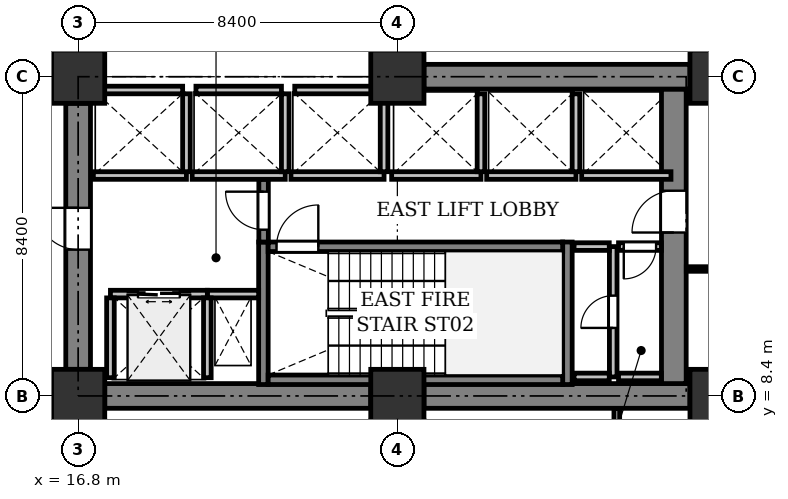
"""IFC4 building model, lengths in metres.
Left out: names, types, materials, properties, quantities, classifications, styles, units other than length and angle.
Written with IfcOpenShell. Run it as: python <this file> out.ifc"""

import sys

from ifc_helpers import new_model, si_unit, direction, frame, frame_2d, origin, origin_2d, place, context, subcontext, project, spatial, rectangle, extrude, element, fill, save


model = new_model("IFC4")
c1 = context("Model", 3, precision=1e-05, world=origin(), true_north=direction((0.0, 1.0)))
c2 = subcontext(c1, "Body", "Model", "MODEL_VIEW")
j1 = project(units=[si_unit("LENGTHUNIT", "METRE"), si_unit("PLANEANGLEUNIT", "RADIAN")], contexts=[c1])
p1 = place(None, origin())
s1 = spatial("IfcSite", under=j1, at=p1, CompositionType="ELEMENT")
p2 = place(p1, origin())
s2 = spatial("IfcBuilding", under=s1, at=p2, CompositionType="ELEMENT")
p3 = place(p2, frame((0.0, 0.0, 50.0)))
s3 = spatial("IfcBuildingStorey", under=s2, at=p3, CompositionType="ELEMENT", Elevation=50.0)
for number, where, z_axis, x_axis in (
    (1, (16.8, 8.4, 0.0), (0.0, 0.0, 1.0), (1.0, 0.0, 0.0)),
    (2, (16.8, 16.8, 0.0), (0.0, 0.0, 1.0), (1.0, 0.0, 0.0)),
    (3, (25.2, 8.4, 0.0), (0.0, 0.0, 1.0), (1.0, 0.0, 0.0)),
    (4, (25.2, 16.8, 0.0), (0.0, 0.0, 1.0), (1.0, 0.0, 0.0)),
    (5, (33.6, 8.4, 0.0), (0.0, 0.0, 1.0), (1.0, 0.0, 0.0)),
    (6, (33.6, 16.8, 0.0), (0.0, 0.0, 1.0), (1.0, 0.0, 0.0)),
):
    element("IfcColumn", number, at=place(p3, frame(where, z_axis=z_axis, x_axis=x_axis)), inside=s3, PredefinedType="COLUMN", context=c2, shape_type="SweptSolid", body=[
        extrude(rectangle(XDim=1.4, YDim=1.4, at=origin_2d()), origin(), (0.0, 0.0, 1.0), 4.2),
    ])
for number, where, z_axis, x_axis in (
    (7, (17.5, 8.4, 0.0), (0.0, 0.0, 1.0), (1.0, 0.0, 0.0)),
    (8, (25.9, 8.4, 0.0), (0.0, 0.0, 1.0), (1.0, 0.0, 0.0)),
):
    element("IfcWall", number, at=place(p3, frame(where, z_axis=z_axis, x_axis=x_axis)), inside=s3, PredefinedType="SHEAR", context=c2, shape_type="SweptSolid", body=[
        extrude(rectangle(XDim=7.0, YDim=0.65, at=frame_2d((3.5, 0.0))), origin(), (0.0, 0.0, 1.0), 3.925),
    ])
p4 = place(p3, frame((32.475, 8.725, 0.0), z_axis=(0.0, 0.0, 1.0), x_axis=(0.0, 1.0, 0.0)))
e9 = element("IfcWall", 9, at=p4, inside=s3, PredefinedType="SHEAR", context=c2, shape_type="SweptSolid", body=[
    extrude(rectangle(XDim=7.75, YDim=0.65, at=frame_2d((3.875, 0.0))), origin(), (0.0, 0.0, 1.0), 3.925),
])
p5 = place(p4, frame((3.975, 0.0, 0.0)))
e10 = element("IfcOpeningElement", 10, at=p5, cuts=e9, PredefinedType="OPENING", context=c2, shape_type="SweptSolid", body=[
    extrude(rectangle(XDim=1.1, YDim=2.15, at=frame_2d((0.55, 1.075))), frame((0.0, 0.335, 0.0), z_axis=(0.0, -1.0, 0.0), x_axis=(1.0, 0.0, 0.0)), (0.0, 0.0, 1.0), 0.67),
])
p6 = place(p3, frame((16.8, 9.1, 0.0), z_axis=(0.0, 0.0, 1.0), x_axis=(0.0, 1.0, 0.0)))
e11 = element("IfcWall", 11, at=p6, inside=s3, PredefinedType="SHEAR", context=c2, shape_type="SweptSolid", body=[
    extrude(rectangle(XDim=7.0, YDim=0.65, at=frame_2d((3.5, 0.0))), origin(), (0.0, 0.0, 1.0), 3.925),
])
p7 = place(p6, frame((3.15, 0.0, 0.0)))
e12 = element("IfcOpeningElement", 12, at=p7, cuts=e11, PredefinedType="OPENING", context=c2, shape_type="SweptSolid", body=[
    extrude(rectangle(XDim=1.1, YDim=2.15, at=frame_2d((0.55, 1.075))), frame((0.0, 0.335, 0.0), z_axis=(0.0, -1.0, 0.0), x_axis=(1.0, 0.0, 0.0)), (0.0, 0.0, 1.0), 0.67),
])
p8 = place(p3, frame((25.9, 16.8, 0.0), z_axis=(0.0, 0.0, 1.0), x_axis=(1.0, 0.0, 0.0)))
e13 = element("IfcWall", 13, at=p8, inside=s3, PredefinedType="SHEAR", context=c2, shape_type="SweptSolid", body=[
    extrude(rectangle(XDim=7.0, YDim=0.65, at=frame_2d((3.5, 0.0))), origin(), (0.0, 0.0, 1.0), 3.925),
])
for number, where, z_axis, x_axis in (
    (14, (21.675, 8.7, 0.0), (0.0, 0.0, 1.0), (0.0, 1.0, 0.0)),
    (15, (29.675, 8.7, 0.0), (0.0, 0.0, 1.0), (0.0, 1.0, 0.0)),
):
    element("IfcWall", number, at=place(p3, frame(where, z_axis=z_axis, x_axis=x_axis)), inside=s3, PredefinedType="SHEAR", context=c2, shape_type="SweptSolid", body=[
        extrude(rectangle(XDim=3.75, YDim=0.25, at=frame_2d((1.875, 0.0))), origin(), (0.0, 0.0, 1.0), 3.925),
    ])
p9 = place(p3, frame((21.8, 8.825, 0.0), z_axis=(0.0, 0.0, 1.0), x_axis=(1.0, 0.0, 0.0)))
e16 = element("IfcWall", 16, at=p9, inside=s3, PredefinedType="SHEAR", context=c2, shape_type="SweptSolid", body=[
    extrude(rectangle(XDim=7.75, YDim=0.25, at=frame_2d((3.875, 0.0))), origin(), (0.0, 0.0, 1.0), 3.925),
])
p10 = place(p3, frame((21.8, 12.325, 0.0), z_axis=(0.0, 0.0, 1.0), x_axis=(1.0, 0.0, 0.0)))
e17 = element("IfcWall", 17, at=p10, inside=s3, PredefinedType="SHEAR", context=c2, shape_type="SweptSolid", body=[
    extrude(rectangle(XDim=7.75, YDim=0.25, at=frame_2d((3.875, 0.0))), origin(), (0.0, 0.0, 1.0), 3.925),
])
p11 = place(p10, frame((0.22, 0.0, 0.0)))
e18 = element("IfcOpeningElement", 18, at=p11, cuts=e17, PredefinedType="OPENING", context=c2, shape_type="SweptSolid", body=[
    extrude(rectangle(XDim=1.1, YDim=2.15, at=frame_2d((0.55, 1.075))), frame((0.0, 0.135, 0.0), z_axis=(0.0, -1.0, 0.0), x_axis=(1.0, 0.0, 0.0)), (0.0, 0.0, 1.0), 0.27),
])
p12 = place(p3, frame((20.2, 11.08, 0.0), z_axis=(0.0, 0.0, 1.0), x_axis=(1.0, 0.0, 0.0)))
e19 = element("IfcWall", 19, at=p12, inside=s3, PredefinedType="PARTITIONING", context=c2, shape_type="SweptSolid", body=[
    extrude(rectangle(XDim=1.35, YDim=0.2, at=frame_2d((0.675, 0.0))), origin(), (0.0, 0.0, 1.0), 3.925),
])
p13 = place(p3, frame((21.68, 12.45, 0.0), z_axis=(0.0, 0.0, 1.0), x_axis=(0.0, 1.0, 0.0)))
e20 = element("IfcWall", 20, at=p13, inside=s3, PredefinedType="SHEAR", context=c2, shape_type="SweptSolid", body=[
    extrude(rectangle(XDim=1.65, YDim=0.25, at=frame_2d((0.825, 0.0))), origin(), (0.0, 0.0, 1.0), 3.925),
])
p14 = place(p13, frame((0.325, 0.0, 0.0)))
e21 = element("IfcOpeningElement", 21, at=p14, cuts=e20, PredefinedType="OPENING", context=c2, shape_type="SweptSolid", body=[
    extrude(rectangle(XDim=1.0, YDim=2.15, at=frame_2d((0.5, 1.075))), frame((0.0, 0.135, 0.0), z_axis=(0.0, -1.0, 0.0), x_axis=(1.0, 0.0, 0.0)), (0.0, 0.0, 1.0), 0.27),
])
p15 = place(p3, frame((17.65, 11.08, 0.0), z_axis=(0.0, 0.0, 1.0), x_axis=(1.0, 0.0, 0.0)))
e22 = element("IfcWall", 22, at=p15, inside=s3, PredefinedType="PARTITIONING", context=c2, shape_type="SweptSolid", body=[
    extrude(rectangle(XDim=2.55, YDim=0.2, at=frame_2d((1.275, 0.0))), origin(), (0.0, 0.0, 1.0), 3.925),
])
p16 = place(p15, frame((0.725, 0.0, 0.0)))
e23 = element("IfcOpeningElement", 23, at=p16, cuts=e22, PredefinedType="OPENING", context=c2, shape_type="SweptSolid", body=[
    extrude(rectangle(XDim=1.1, YDim=2.2, at=frame_2d((0.55, 1.1))), frame((0.0, 0.11, 0.0), z_axis=(0.0, -1.0, 0.0), x_axis=(1.0, 0.0, 0.0)), (0.0, 0.0, 1.0), 0.22),
])
for number, where, z_axis, x_axis in (
    (24, (20.2, 8.88, 0.0), (0.0, 0.0, 1.0), (0.0, 1.0, 0.0)),
    (25, (17.65, 8.88, 0.0), (0.0, 0.0, 1.0), (0.0, 1.0, 0.0)),
):
    element("IfcWall", number, at=place(p3, frame(where, z_axis=z_axis, x_axis=x_axis)), inside=s3, PredefinedType="PARTITIONING", context=c2, shape_type="SweptSolid", body=[
        extrude(rectangle(XDim=2.1, YDim=0.2, at=frame_2d((1.05, 0.0))), origin(), (0.0, 0.0, 1.0), 3.925),
    ])
p17 = place(p3, frame((17.2, 14.2, 0.0), z_axis=(0.0, 0.0, 1.0), x_axis=(1.0, 0.0, 0.0)))
e26 = element("IfcWall", 26, at=p17, inside=s3, PredefinedType="PARTITIONING", context=c2, shape_type="SweptSolid", body=[
    extrude(rectangle(XDim=2.45, YDim=0.2, at=frame_2d((1.225, 0.0))), origin(), (0.0, 0.0, 1.0), 3.925),
])
p18 = place(p3, frame((19.65, 14.3, 0.0), z_axis=(0.0, 0.0, 1.0), x_axis=(0.0, 1.0, 0.0)))
e27 = element("IfcWall", 27, at=p18, inside=s3, PredefinedType="PARTITIONING", context=c2, shape_type="SweptSolid", body=[
    extrude(rectangle(XDim=2.05, YDim=0.2, at=frame_2d((1.025, 0.0))), origin(), (0.0, 0.0, 1.0), 3.925),
])
p19 = place(p3, frame((17.3, 16.45, 0.0), z_axis=(0.0, 0.0, 1.0), x_axis=(1.0, 0.0, 0.0)))
e28 = element("IfcWall", 28, at=p19, inside=s3, PredefinedType="PARTITIONING", context=c2, shape_type="SweptSolid", body=[
    extrude(rectangle(XDim=2.25, YDim=0.2, at=frame_2d((1.125, 0.0))), origin(), (0.0, 0.0, 1.0), 3.925),
])
p20 = place(p3, frame((19.8, 14.2, 0.0), z_axis=(0.0, 0.0, 1.0), x_axis=(1.0, 0.0, 0.0)))
e29 = element("IfcWall", 29, at=p20, inside=s3, PredefinedType="PARTITIONING", context=c2, shape_type="SweptSolid", body=[
    extrude(rectangle(XDim=2.45, YDim=0.2, at=frame_2d((1.225, 0.0))), origin(), (0.0, 0.0, 1.0), 3.925),
])
p21 = place(p3, frame((22.25, 14.3, 0.0), z_axis=(0.0, 0.0, 1.0), x_axis=(0.0, 1.0, 0.0)))
e30 = element("IfcWall", 30, at=p21, inside=s3, PredefinedType="PARTITIONING", context=c2, shape_type="SweptSolid", body=[
    extrude(rectangle(XDim=2.05, YDim=0.2, at=frame_2d((1.025, 0.0))), origin(), (0.0, 0.0, 1.0), 3.925),
])
p22 = place(p3, frame((19.9, 16.45, 0.0), z_axis=(0.0, 0.0, 1.0), x_axis=(1.0, 0.0, 0.0)))
e31 = element("IfcWall", 31, at=p22, inside=s3, PredefinedType="PARTITIONING", context=c2, shape_type="SweptSolid", body=[
    extrude(rectangle(XDim=2.25, YDim=0.2, at=frame_2d((1.125, 0.0))), origin(), (0.0, 0.0, 1.0), 3.925),
])
p23 = place(p3, frame((22.4, 14.2, 0.0), z_axis=(0.0, 0.0, 1.0), x_axis=(1.0, 0.0, 0.0)))
e32 = element("IfcWall", 32, at=p23, inside=s3, PredefinedType="PARTITIONING", context=c2, shape_type="SweptSolid", body=[
    extrude(rectangle(XDim=2.45, YDim=0.2, at=frame_2d((1.225, 0.0))), origin(), (0.0, 0.0, 1.0), 3.925),
])
p24 = place(p3, frame((24.85, 14.3, 0.0), z_axis=(0.0, 0.0, 1.0), x_axis=(0.0, 1.0, 0.0)))
e33 = element("IfcWall", 33, at=p24, inside=s3, PredefinedType="PARTITIONING", context=c2, shape_type="SweptSolid", body=[
    extrude(rectangle(XDim=2.05, YDim=0.2, at=frame_2d((1.025, 0.0))), origin(), (0.0, 0.0, 1.0), 3.925),
])
p25 = place(p3, frame((22.5, 16.45, 0.0), z_axis=(0.0, 0.0, 1.0), x_axis=(1.0, 0.0, 0.0)))
e34 = element("IfcWall", 34, at=p25, inside=s3, PredefinedType="PARTITIONING", context=c2, shape_type="SweptSolid", body=[
    extrude(rectangle(XDim=2.25, YDim=0.2, at=frame_2d((1.125, 0.0))), origin(), (0.0, 0.0, 1.0), 3.925),
])
p26 = place(p3, frame((25.05, 14.2, 0.0), z_axis=(0.0, 0.0, 1.0), x_axis=(1.0, 0.0, 0.0)))
e35 = element("IfcWall", 35, at=p26, inside=s3, PredefinedType="PARTITIONING", context=c2, shape_type="SweptSolid", body=[
    extrude(rectangle(XDim=2.35, YDim=0.2, at=frame_2d((1.175, 0.0))), origin(), (0.0, 0.0, 1.0), 3.925),
])
p27 = place(p3, frame((27.4, 14.3, 0.0), z_axis=(0.0, 0.0, 1.0), x_axis=(0.0, 1.0, 0.0)))
e36 = element("IfcWall", 36, at=p27, inside=s3, PredefinedType="PARTITIONING", context=c2, shape_type="SweptSolid", body=[
    extrude(rectangle(XDim=2.05, YDim=0.2, at=frame_2d((1.025, 0.0))), origin(), (0.0, 0.0, 1.0), 3.925),
])
p28 = place(p3, frame((27.55, 14.2, 0.0), z_axis=(0.0, 0.0, 1.0), x_axis=(1.0, 0.0, 0.0)))
e37 = element("IfcWall", 37, at=p28, inside=s3, PredefinedType="PARTITIONING", context=c2, shape_type="SweptSolid", body=[
    extrude(rectangle(XDim=2.35, YDim=0.2, at=frame_2d((1.175, 0.0))), origin(), (0.0, 0.0, 1.0), 3.925),
])
p29 = place(p3, frame((29.9, 14.3, 0.0), z_axis=(0.0, 0.0, 1.0), x_axis=(0.0, 1.0, 0.0)))
e38 = element("IfcWall", 38, at=p29, inside=s3, PredefinedType="PARTITIONING", context=c2, shape_type="SweptSolid", body=[
    extrude(rectangle(XDim=2.05, YDim=0.2, at=frame_2d((1.025, 0.0))), origin(), (0.0, 0.0, 1.0), 3.925),
])
p30 = place(p3, frame((30.05, 14.2, 0.0), z_axis=(0.0, 0.0, 1.0), x_axis=(1.0, 0.0, 0.0)))
e39 = element("IfcWall", 39, at=p30, inside=s3, PredefinedType="PARTITIONING", context=c2, shape_type="SweptSolid", body=[
    extrude(rectangle(XDim=2.35, YDim=0.2, at=frame_2d((1.175, 0.0))), origin(), (0.0, 0.0, 1.0), 3.925),
])
p31 = place(p3, frame((30.88, 8.9, 0.0), z_axis=(0.0, 0.0, 1.0), x_axis=(0.0, 1.0, 0.0)))
e40 = element("IfcWall", 40, at=p31, inside=s3, PredefinedType="PARTITIONING", context=c2, shape_type="SweptSolid", body=[
    extrude(rectangle(XDim=3.43, YDim=0.2, at=frame_2d((1.715, 0.0))), origin(), (0.0, 0.0, 1.0), 3.925),
])
p32 = place(p31, frame((1.29, 0.0, 0.0)))
e41 = element("IfcOpeningElement", 41, at=p32, cuts=e40, PredefinedType="OPENING", context=c2, shape_type="SweptSolid", body=[
    extrude(rectangle(XDim=0.85, YDim=2.15, at=frame_2d((0.425, 1.075))), frame((0.0, 0.11, 0.0), z_axis=(0.0, -1.0, 0.0), x_axis=(1.0, 0.0, 0.0)), (0.0, 0.0, 1.0), 0.22),
])
for number, where, z_axis, x_axis in (
    (42, (30.776, 12.33, 0.0), (0.0, 0.0, 1.0), (-1.0, 0.0, 0.0)),
    (43, (29.85, 8.9, 0.0), (0.0, 0.0, 1.0), (1.0, 0.0, 0.0)),
):
    element("IfcWall", number, at=place(p3, frame(where, z_axis=z_axis, x_axis=x_axis)), inside=s3, PredefinedType="PARTITIONING", context=c2, shape_type="SweptSolid", body=[
        extrude(rectangle(XDim=0.926, YDim=0.2, at=frame_2d((0.463, 0.0))), origin(), (0.0, 0.0, 1.0), 3.925),
    ])
p33 = place(p3, frame((32.146, 12.33, 0.0), z_axis=(0.0, 0.0, 1.0), x_axis=(-1.0, 0.0, 0.0)))
e44 = element("IfcWall", 44, at=p33, inside=s3, PredefinedType="PARTITIONING", context=c2, shape_type="SweptSolid", body=[
    extrude(rectangle(XDim=1.126, YDim=0.2, at=frame_2d((0.563, 0.0))), origin(), (0.0, 0.0, 1.0), 3.925),
])
p34 = place(p33, frame((0.138, 0.0, 0.0)))
e45 = element("IfcOpeningElement", 45, at=p34, cuts=e44, PredefinedType="OPENING", context=c2, shape_type="SweptSolid", body=[
    extrude(rectangle(XDim=0.85, YDim=2.15, at=frame_2d((0.425, 1.075))), frame((0.0, 0.11, 0.0), z_axis=(0.0, -1.0, 0.0), x_axis=(1.0, 0.0, 0.0)), (0.0, 0.0, 1.0), 0.22),
])
p35 = place(p3, frame((31.02, 8.9, 0.0), z_axis=(0.0, 0.0, 1.0), x_axis=(1.0, 0.0, 0.0)))
e46 = element("IfcWall", 46, at=p35, inside=s3, PredefinedType="PARTITIONING", context=c2, shape_type="SweptSolid", body=[
    extrude(rectangle(XDim=1.126, YDim=0.2, at=frame_2d((0.563, 0.0))), origin(), (0.0, 0.0, 1.0), 3.925),
])
p36 = place(p3, frame((30.975, 0.169, 0.0), z_axis=(0.0, 0.0, 1.0), x_axis=(0.0, 1.0, 0.0)))
e47 = element("IfcWall", 47, at=p36, inside=s3, PredefinedType="PARTITIONING", context=c2, shape_type="SweptSolid", body=[
    extrude(rectangle(XDim=7.902, YDim=0.15, at=frame_2d((3.951, 0.0))), origin(), (0.0, 0.0, 1.0), 3.925),
])
p37 = place(p3, frame((34.261, 11.74, 0.0), z_axis=(0.0, 0.0, 1.0), x_axis=(-1.0, 0.0, 0.0)))
e48 = element("IfcWall", 48, at=p37, inside=s3, PredefinedType="PARTITIONING", context=c2, shape_type="SweptSolid", body=[
    extrude(rectangle(XDim=1.457, YDim=0.12, at=frame_2d((0.729, 0.0))), origin(), (0.0, 0.0, 1.0), 3.323),
])
p38 = place(p5, origin())
e49 = element("IfcDoor", 49, at=p38, inside=s3, OperationType="SINGLE_SWING_LEFT", PredefinedType="DOOR", context=c2, shape_type="SweptSolid", body=[
    extrude(rectangle(XDim=1.1, YDim=2.15, at=frame_2d((0.55, 1.075))), frame((0.0, 0.025, 0.0), z_axis=(0.0, -1.0, 0.0), x_axis=(1.0, 0.0, 0.0)), (0.0, 0.0, 1.0), 0.05),
])
fill(e10, e49)
p39 = place(p7, origin())
e50 = element("IfcDoor", 50, at=p39, inside=s3, OperationType="SINGLE_SWING_RIGHT", PredefinedType="DOOR", context=c2, shape_type="SweptSolid", body=[
    extrude(rectangle(XDim=1.1, YDim=2.15, at=frame_2d((0.55, 1.075))), frame((0.0, 0.025, 0.0), z_axis=(0.0, -1.0, 0.0), x_axis=(1.0, 0.0, 0.0)), (0.0, 0.0, 1.0), 0.05),
])
fill(e12, e50)
p40 = place(p11, origin())
e51 = element("IfcDoor", 51, at=p40, inside=s3, OperationType="SINGLE_SWING_RIGHT", PredefinedType="DOOR", context=c2, shape_type="SweptSolid", body=[
    extrude(rectangle(XDim=1.1, YDim=2.15, at=frame_2d((0.55, 1.075))), frame((0.0, 0.025, 0.0), z_axis=(0.0, -1.0, 0.0), x_axis=(1.0, 0.0, 0.0)), (0.0, 0.0, 1.0), 0.05),
])
fill(e18, e51)
p41 = place(p14, origin())
e52 = element("IfcDoor", 52, at=p41, inside=s3, OperationType="SINGLE_SWING_RIGHT", PredefinedType="DOOR", context=c2, shape_type="SweptSolid", body=[
    extrude(rectangle(XDim=1.0, YDim=2.15, at=frame_2d((0.5, 1.075))), frame((0.0, 0.025, 0.0), z_axis=(0.0, -1.0, 0.0), x_axis=(1.0, 0.0, 0.0)), (0.0, 0.0, 1.0), 0.05),
])
fill(e21, e52)
p42 = place(p16, origin())
e53 = element("IfcDoor", 53, at=p42, inside=s3, OperationType="DOUBLE_DOOR_SLIDING", PredefinedType="DOOR", context=c2, shape_type="SweptSolid", body=[
    extrude(rectangle(XDim=1.1, YDim=2.2, at=frame_2d((0.55, 1.1))), frame((0.0, 0.025, 0.0), z_axis=(0.0, -1.0, 0.0), x_axis=(1.0, 0.0, 0.0)), (0.0, 0.0, 1.0), 0.05),
])
fill(e23, e53)
p43 = place(p32, origin())
e54 = element("IfcDoor", 54, at=p43, inside=s3, OperationType="SINGLE_SWING_LEFT", PredefinedType="DOOR", context=c2, shape_type="SweptSolid", body=[
    extrude(rectangle(XDim=0.85, YDim=2.15, at=frame_2d((0.425, 1.075))), frame((0.0, 0.025, 0.0), z_axis=(0.0, -1.0, 0.0), x_axis=(1.0, 0.0, 0.0)), (0.0, 0.0, 1.0), 0.05),
])
fill(e41, e54)
p44 = place(p34, origin())
e55 = element("IfcDoor", 55, at=p44, inside=s3, OperationType="SINGLE_SWING_RIGHT", PredefinedType="DOOR", context=c2, shape_type="SweptSolid", body=[
    extrude(rectangle(XDim=0.85, YDim=2.15, at=frame_2d((0.425, 1.075))), frame((0.0, 0.025, 0.0), z_axis=(0.0, -1.0, 0.0), x_axis=(1.0, 0.0, 0.0)), (0.0, 0.0, 1.0), 0.05),
])
fill(e45, e55)
save(model, sys.argv[1])
